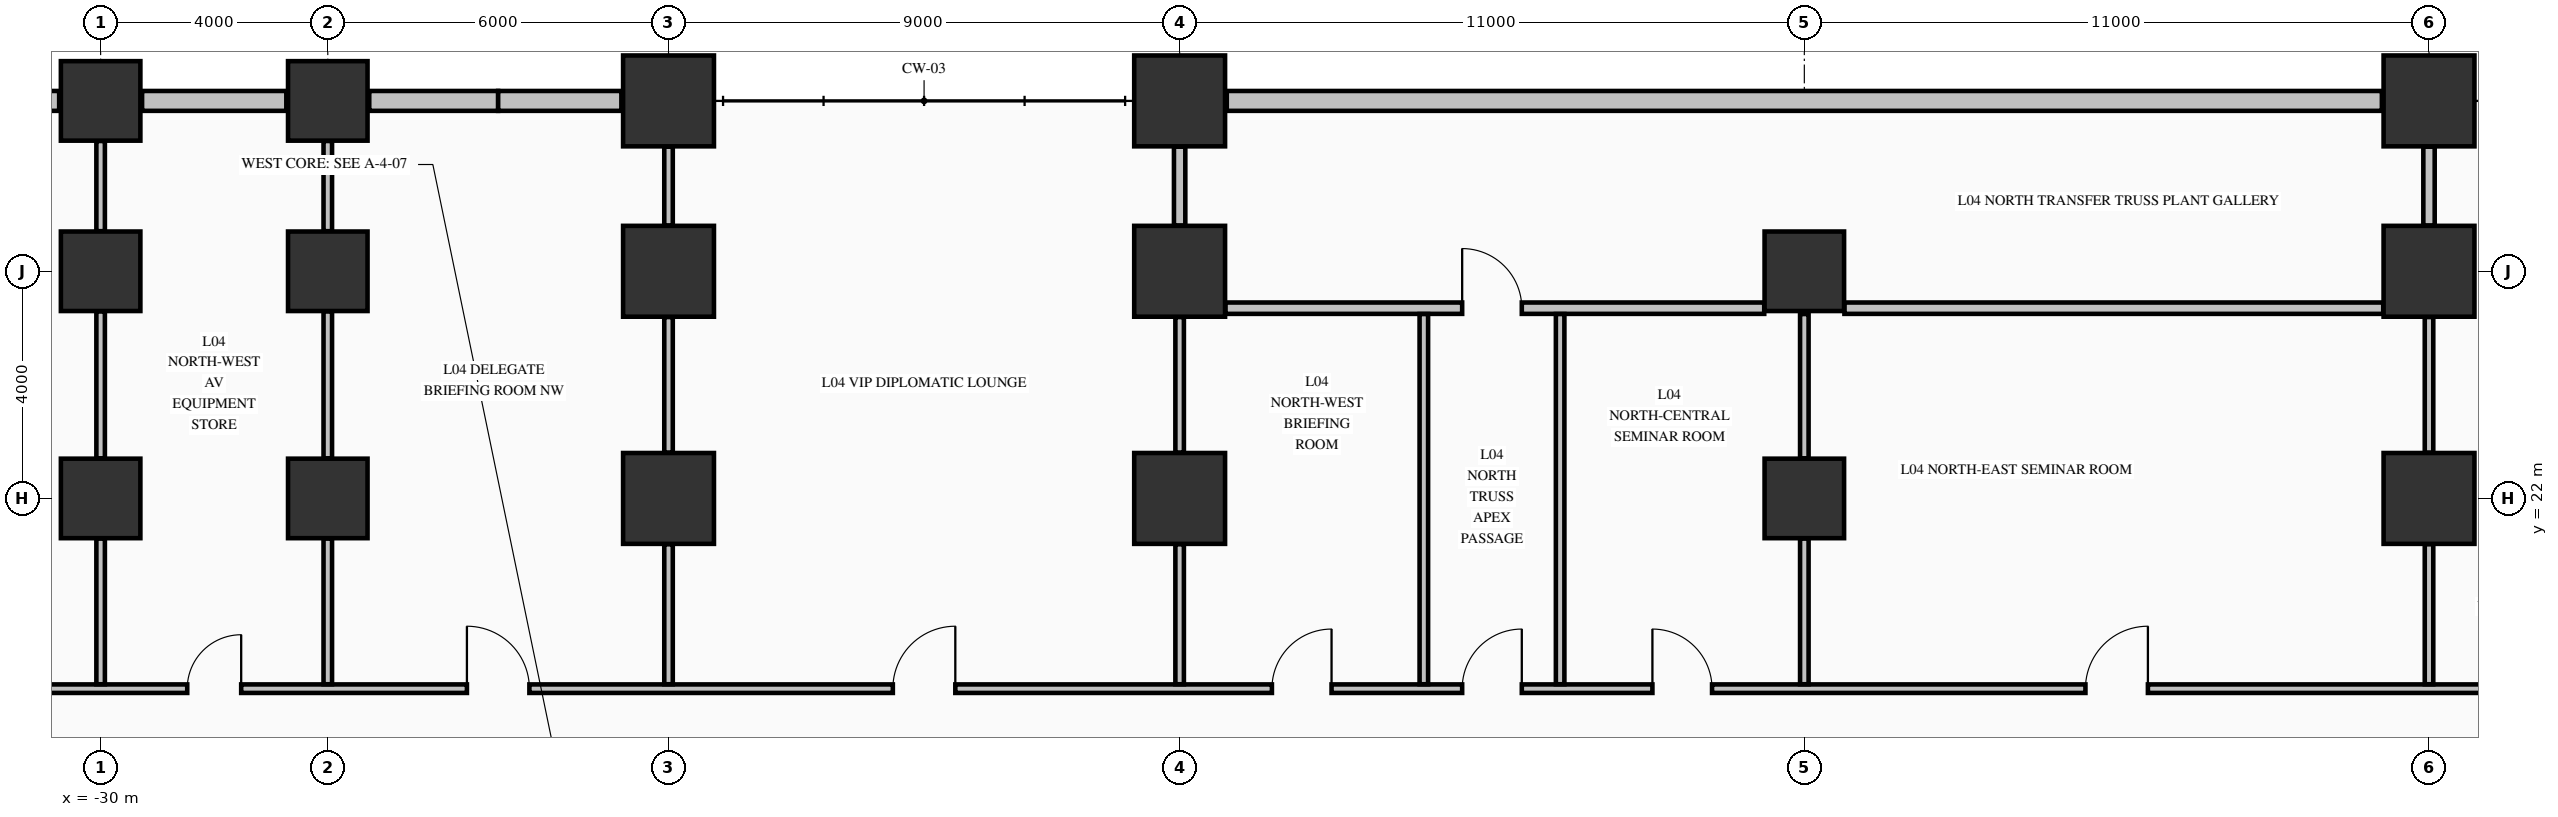
"""IFC4 building model, lengths in metres.
Left out: names, types, materials, properties, quantities, classifications, styles, units other than length and angle.
Written with IfcOpenShell. Run it as: python <this file> out.ifc"""

import sys

from ifc_helpers import new_model, si_unit, direction, frame, frame_2d, origin, origin_2d, place, context, subcontext, project, spatial, rectangle, extrude, element, fill, save


model = new_model("IFC4")
c1 = context("Model", 3, precision=1e-05, world=origin(), true_north=direction((0.0, 1.0)))
c2 = subcontext(c1, "Body", "Model", "MODEL_VIEW")
j1 = project(units=[si_unit("LENGTHUNIT", "METRE"), si_unit("PLANEANGLEUNIT", "RADIAN")], contexts=[c1])
p1 = place(None, origin())
s1 = spatial("IfcSite", under=j1, at=p1, CompositionType="ELEMENT")
p2 = place(p1, origin())
s2 = spatial("IfcBuilding", under=s1, at=p2, CompositionType="ELEMENT")
p3 = place(p2, frame((0.0, 0.0, 21.76)))
s3 = spatial("IfcBuildingStorey", under=s2, at=p3, CompositionType="ELEMENT", Elevation=21.76)
for number, where, z_axis, x_axis in (
    (1, (-30.0, 22.0, -0.45), (0.0, 0.0, 1.0), (1.0, 0.0, 0.0)),
    (2, (-30.0, 26.0, -0.45), (0.0, 0.0, 1.0), (1.0, 0.0, 0.0)),
    (3, (-30.0, 29.0, -0.45), (0.0, 0.0, 1.0), (1.0, 0.0, 0.0)),
    (4, (-26.0, 22.0, -0.45), (0.0, 0.0, 1.0), (1.0, 0.0, 0.0)),
    (5, (-26.0, 26.0, -0.45), (0.0, 0.0, 1.0), (1.0, 0.0, 0.0)),
    (6, (-26.0, 29.0, -0.45), (0.0, 0.0, 1.0), (1.0, 0.0, 0.0)),
):
    element("IfcColumn", number, at=place(p3, frame(where, z_axis=z_axis, x_axis=x_axis)), inside=s3, PredefinedType="COLUMN", context=c2, shape_type="SweptSolid", body=[
        extrude(rectangle(XDim=1.4, YDim=1.4, at=origin_2d()), origin(), (0.0, 0.0, 1.0), 5.44),
    ])
for number, where, z_axis, x_axis in (
    (7, (-20.0, 22.0, -0.45), (0.0, 0.0, 1.0), (1.0, 0.0, 0.0)),
    (8, (-20.0, 26.0, -0.45), (0.0, 0.0, 1.0), (1.0, 0.0, 0.0)),
    (9, (-20.0, 29.0, -0.45), (0.0, 0.0, 1.0), (1.0, 0.0, 0.0)),
    (10, (-11.0, 22.0, -0.45), (0.0, 0.0, 1.0), (1.0, 0.0, 0.0)),
    (11, (-11.0, 26.0, -0.45), (0.0, 0.0, 1.0), (1.0, 0.0, 0.0)),
    (12, (-11.0, 29.0, -0.45), (0.0, 0.0, 1.0), (1.0, 0.0, 0.0)),
):
    element("IfcColumn", number, at=place(p3, frame(where, z_axis=z_axis, x_axis=x_axis)), inside=s3, PredefinedType="COLUMN", context=c2, shape_type="SweptSolid", body=[
        extrude(rectangle(XDim=1.6, YDim=1.6, at=origin_2d()), origin(), (0.0, 0.0, 1.0), 5.44),
    ])
for number, where, z_axis, x_axis in (
    (13, (0.0, 22.0, -0.45), (0.0, 0.0, 1.0), (1.0, 0.0, 0.0)),
    (14, (0.0, 26.0, -0.45), (0.0, 0.0, 1.0), (1.0, 0.0, 0.0)),
):
    element("IfcColumn", number, at=place(p3, frame(where, z_axis=z_axis, x_axis=x_axis)), inside=s3, PredefinedType="COLUMN", context=c2, shape_type="SweptSolid", body=[
        extrude(rectangle(XDim=1.4, YDim=1.4, at=origin_2d()), origin(), (0.0, 0.0, 1.0), 5.44),
    ])
for number, where, z_axis, x_axis in (
    (15, (11.0, 22.0, -0.45), (0.0, 0.0, 1.0), (1.0, 0.0, 0.0)),
    (16, (11.0, 26.0, -0.45), (0.0, 0.0, 1.0), (1.0, 0.0, 0.0)),
    (17, (11.0, 29.0, -0.45), (0.0, 0.0, 1.0), (1.0, 0.0, 0.0)),
):
    element("IfcColumn", number, at=place(p3, frame(where, z_axis=z_axis, x_axis=x_axis)), inside=s3, PredefinedType="COLUMN", context=c2, shape_type="SweptSolid", body=[
        extrude(rectangle(XDim=1.6, YDim=1.6, at=origin_2d()), origin(), (0.0, 0.0, 1.0), 5.44),
    ])
for number, where, z_axis, x_axis in (
    (18, (-30.73, 29.0, 0.0), (0.0, 0.0, 1.0), (-1.0, 0.0, 0.0)),
    (19, (-26.73, 29.0, 0.0), (0.0, 0.0, 1.0), (-1.0, 0.0, 0.0)),
):
    element("IfcWall", number, at=place(p3, frame(where, z_axis=z_axis, x_axis=x_axis)), inside=s3, PredefinedType="STANDARD", context=c2, shape_type="SweptSolid", body=[
        extrude(rectangle(XDim=2.54, YDim=0.35, at=frame_2d((1.27, 0.0))), origin(), (0.0, 0.0, 1.0), 3.332),
    ])
p4 = place(p3, frame((-23.0, 29.0, 0.0), z_axis=(0.0, 0.0, 1.0), x_axis=(-1.0, 0.0, 0.0)))
e20 = element("IfcWall", 20, at=p4, inside=s3, PredefinedType="STANDARD", context=c2, shape_type="SweptSolid", body=[
    extrude(rectangle(XDim=2.27, YDim=0.35, at=frame_2d((1.135, 0.0))), origin(), (0.0, 0.0, 1.0), 3.332),
])
p5 = place(p3, frame((-20.83, 29.0, 0.0), z_axis=(0.0, 0.0, 1.0), x_axis=(-1.0, 0.0, 0.0)))
e21 = element("IfcWall", 21, at=p5, inside=s3, PredefinedType="STANDARD", context=c2, shape_type="SweptSolid", body=[
    extrude(rectangle(XDim=2.17, YDim=0.35, at=frame_2d((1.085, 0.0))), origin(), (0.0, 0.0, 1.0), 3.332),
])
p6 = place(p3, frame((10.17, 29.0, 0.0), z_axis=(0.0, 0.0, 1.0), x_axis=(-1.0, 0.0, 0.0)))
e22 = element("IfcWall", 22, at=p6, inside=s3, PredefinedType="STANDARD", context=c2, shape_type="SweptSolid", body=[
    extrude(rectangle(XDim=20.34, YDim=0.35, at=frame_2d((10.17, 0.0))), origin(), (0.0, 0.0, 1.0), 2.582),
])
p7 = place(p3, frame((-33.835, 18.65, 0.0), z_axis=(0.0, 0.0, 1.0), x_axis=(1.0, 0.0, 0.0)))
e23 = element("IfcWall", 23, at=p7, inside=s3, PredefinedType="PARTITIONING", context=c2, shape_type="SweptSolid", body=[
    extrude(rectangle(XDim=63.685, YDim=0.15, at=frame_2d((31.843, 0.0))), origin(), (0.0, 0.0, 1.0), 4.99),
])
p8 = place(p7, frame((27.81, 0.0, 0.0)))
e24 = element("IfcOpeningElement", 24, at=p8, cuts=e23, PredefinedType="OPENING", context=c2, shape_type="SweptSolid", body=[
    extrude(rectangle(XDim=1.05, YDim=2.15, at=frame_2d((0.525, 1.075))), frame((0.0, 0.085, 0.0), z_axis=(0.0, -1.0, 0.0), x_axis=(1.0, 0.0, 0.0)), (0.0, 0.0, 1.0), 0.17),
])
p9 = place(p7, frame((24.46, 0.0, 0.0)))
e25 = element("IfcOpeningElement", 25, at=p9, cuts=e23, PredefinedType="OPENING", context=c2, shape_type="SweptSolid", body=[
    extrude(rectangle(XDim=1.05, YDim=2.15, at=frame_2d((0.525, 1.075))), frame((0.0, 0.085, 0.0), z_axis=(0.0, -1.0, 0.0), x_axis=(1.0, 0.0, 0.0)), (0.0, 0.0, 1.0), 0.17),
])
p10 = place(p7, frame((31.16, 0.0, 0.0)))
e26 = element("IfcOpeningElement", 26, at=p10, cuts=e23, PredefinedType="OPENING", context=c2, shape_type="SweptSolid", body=[
    extrude(rectangle(XDim=1.05, YDim=2.15, at=frame_2d((0.525, 1.075))), frame((0.0, 0.085, 0.0), z_axis=(0.0, -1.0, 0.0), x_axis=(1.0, 0.0, 0.0)), (0.0, 0.0, 1.0), 0.17),
])
p11 = place(p7, frame((38.785, 0.0, 0.0)))
e27 = element("IfcOpeningElement", 27, at=p11, cuts=e23, PredefinedType="OPENING", context=c2, shape_type="SweptSolid", body=[
    extrude(rectangle(XDim=1.1, YDim=2.15, at=frame_2d((0.55, 1.075))), frame((0.0, 0.085, 0.0), z_axis=(0.0, -1.0, 0.0), x_axis=(1.0, 0.0, 0.0)), (0.0, 0.0, 1.0), 0.17),
])
p12 = place(p7, frame((1.285, 0.0, 0.0)))
e28 = element("IfcOpeningElement", 28, at=p12, cuts=e23, PredefinedType="OPENING", context=c2, shape_type="SweptSolid", body=[
    extrude(rectangle(XDim=1.1, YDim=2.15, at=frame_2d((0.55, 1.075))), frame((0.0, 0.085, 0.0), z_axis=(0.0, -1.0, 0.0), x_axis=(1.0, 0.0, 0.0)), (0.0, 0.0, 1.0), 0.17),
])
p13 = place(p7, frame((5.36, 0.0, 0.0)))
e29 = element("IfcOpeningElement", 29, at=p13, cuts=e23, PredefinedType="OPENING", context=c2, shape_type="SweptSolid", body=[
    extrude(rectangle(XDim=0.95, YDim=2.15, at=frame_2d((0.475, 1.075))), frame((0.0, 0.085, 0.0), z_axis=(0.0, -1.0, 0.0), x_axis=(1.0, 0.0, 0.0)), (0.0, 0.0, 1.0), 0.17),
])
p14 = place(p7, frame((10.285, 0.0, 0.0)))
e30 = element("IfcOpeningElement", 30, at=p14, cuts=e23, PredefinedType="OPENING", context=c2, shape_type="SweptSolid", body=[
    extrude(rectangle(XDim=1.1, YDim=2.15, at=frame_2d((0.55, 1.075))), frame((0.0, 0.085, 0.0), z_axis=(0.0, -1.0, 0.0), x_axis=(1.0, 0.0, 0.0)), (0.0, 0.0, 1.0), 0.17),
])
p15 = place(p7, frame((17.785, 0.0, 0.0)))
e31 = element("IfcOpeningElement", 31, at=p15, cuts=e23, PredefinedType="OPENING", context=c2, shape_type="SweptSolid", body=[
    extrude(rectangle(XDim=1.1, YDim=2.15, at=frame_2d((0.55, 1.075))), frame((0.0, 0.085, 0.0), z_axis=(0.0, -1.0, 0.0), x_axis=(1.0, 0.0, 0.0)), (0.0, 0.0, 1.0), 0.17),
])
p16 = place(p7, frame((61.215, 0.0, 0.0)))
e32 = element("IfcOpeningElement", 32, at=p16, cuts=e23, PredefinedType="OPENING", context=c2, shape_type="SweptSolid", body=[
    extrude(rectangle(XDim=1.1, YDim=2.15, at=frame_2d((0.55, 1.075))), frame((0.0, 0.085, 0.0), z_axis=(0.0, -1.0, 0.0), x_axis=(1.0, 0.0, 0.0)), (0.0, 0.0, 1.0), 0.17),
])
p17 = place(p7, frame((47.56, 0.0, 0.0)))
e33 = element("IfcOpeningElement", 33, at=p17, cuts=e23, PredefinedType="OPENING", context=c2, shape_type="SweptSolid", body=[
    extrude(rectangle(XDim=0.95, YDim=2.15, at=frame_2d((0.475, 1.075))), frame((0.0, 0.085, 0.0), z_axis=(0.0, -1.0, 0.0), x_axis=(1.0, 0.0, 0.0)), (0.0, 0.0, 1.0), 0.17),
])
p18 = place(p7, frame((51.31, 0.0, 0.0)))
e34 = element("IfcOpeningElement", 34, at=p18, cuts=e23, PredefinedType="OPENING", context=c2, shape_type="SweptSolid", body=[
    extrude(rectangle(XDim=1.05, YDim=2.15, at=frame_2d((0.525, 1.075))), frame((0.0, 0.085, 0.0), z_axis=(0.0, -1.0, 0.0), x_axis=(1.0, 0.0, 0.0)), (0.0, 0.0, 1.0), 0.17),
])
p19 = place(p7, frame((56.06, 0.0, 0.0)))
e35 = element("IfcOpeningElement", 35, at=p19, cuts=e23, PredefinedType="OPENING", context=c2, shape_type="SweptSolid", body=[
    extrude(rectangle(XDim=0.95, YDim=2.15, at=frame_2d((0.475, 1.075))), frame((0.0, 0.085, 0.0), z_axis=(0.0, -1.0, 0.0), x_axis=(1.0, 0.0, 0.0)), (0.0, 0.0, 1.0), 0.17),
])
p20 = place(p7, frame((58.535, 0.0, 0.0)))
e36 = element("IfcOpeningElement", 36, at=p20, cuts=e23, PredefinedType="OPENING", context=c2, shape_type="SweptSolid", body=[
    extrude(rectangle(XDim=0.9, YDim=2.15, at=frame_2d((0.45, 1.075))), frame((0.0, 0.085, 0.0), z_axis=(0.0, -1.0, 0.0), x_axis=(1.0, 0.0, 0.0)), (0.0, 0.0, 1.0), 0.17),
])
p21 = place(p3, frame((-10.194, 25.35, 0.0), z_axis=(0.0, 0.0, 1.0), x_axis=(1.0, 0.0, 0.0)))
e37 = element("IfcWall", 37, at=p21, inside=s3, PredefinedType="PARTITIONING", context=c2, shape_type="SweptSolid", body=[
    extrude(rectangle(XDim=9.488, YDim=0.2, at=frame_2d((4.744, 0.0))), origin(), (0.0, 0.0, 1.0), 3.332),
])
p22 = place(p21, frame((4.169, 0.0, 0.0)))
e38 = element("IfcOpeningElement", 38, at=p22, cuts=e37, PredefinedType="OPENING", context=c2, shape_type="SweptSolid", body=[
    extrude(rectangle(XDim=1.05, YDim=2.15, at=frame_2d((0.525, 1.075))), frame((0.0, 0.11, 0.0), z_axis=(0.0, -1.0, 0.0), x_axis=(1.0, 0.0, 0.0)), (0.0, 0.0, 1.0), 0.22),
])
p23 = place(p3, frame((0.706, 25.35, 0.0), z_axis=(0.0, 0.0, 1.0), x_axis=(1.0, 0.0, 0.0)))
e39 = element("IfcWall", 39, at=p23, inside=s3, PredefinedType="PARTITIONING", context=c2, shape_type="SweptSolid", body=[
    extrude(rectangle(XDim=9.488, YDim=0.2, at=frame_2d((4.744, 0.0))), origin(), (0.0, 0.0, 1.0), 3.332),
])
p24 = place(p3, frame((-30.0, 18.728, 0.0), z_axis=(0.0, 0.0, 1.0), x_axis=(0.0, 1.0, 0.0)))
e40 = element("IfcWall", 40, at=p24, inside=s3, PredefinedType="PARTITIONING", context=c2, shape_type="SweptSolid", body=[
    extrude(rectangle(XDim=2.566, YDim=0.15, at=frame_2d((1.283, 0.0))), origin(), (0.0, 0.0, 1.0), 3.332),
])
p25 = place(p3, frame((-30.0, 22.706, 0.0), z_axis=(0.0, 0.0, 1.0), x_axis=(0.0, 1.0, 0.0)))
e41 = element("IfcWall", 41, at=p25, inside=s3, PredefinedType="PARTITIONING", context=c2, shape_type="SweptSolid", body=[
    extrude(rectangle(XDim=2.588, YDim=0.15, at=frame_2d((1.294, 0.0))), origin(), (0.0, 0.0, 1.0), 3.332),
])
p26 = place(p3, frame((-30.0, 26.706, 0.0), z_axis=(0.0, 0.0, 1.0), x_axis=(0.0, 1.0, 0.0)))
e42 = element("IfcWall", 42, at=p26, inside=s3, PredefinedType="PARTITIONING", context=c2, shape_type="SweptSolid", body=[
    extrude(rectangle(XDim=1.588, YDim=0.15, at=frame_2d((0.794, 0.0))), origin(), (0.0, 0.0, 1.0), 3.332),
])
p27 = place(p3, frame((-26.0, 18.728, 0.0), z_axis=(0.0, 0.0, 1.0), x_axis=(0.0, 1.0, 0.0)))
e43 = element("IfcWall", 43, at=p27, inside=s3, PredefinedType="PARTITIONING", context=c2, shape_type="SweptSolid", body=[
    extrude(rectangle(XDim=2.566, YDim=0.15, at=frame_2d((1.283, 0.0))), origin(), (0.0, 0.0, 1.0), 3.332),
])
p28 = place(p3, frame((-26.0, 22.706, 0.0), z_axis=(0.0, 0.0, 1.0), x_axis=(0.0, 1.0, 0.0)))
e44 = element("IfcWall", 44, at=p28, inside=s3, PredefinedType="PARTITIONING", context=c2, shape_type="SweptSolid", body=[
    extrude(rectangle(XDim=2.588, YDim=0.15, at=frame_2d((1.294, 0.0))), origin(), (0.0, 0.0, 1.0), 3.332),
])
p29 = place(p3, frame((-26.0, 26.706, 0.0), z_axis=(0.0, 0.0, 1.0), x_axis=(0.0, 1.0, 0.0)))
e45 = element("IfcWall", 45, at=p29, inside=s3, PredefinedType="PARTITIONING", context=c2, shape_type="SweptSolid", body=[
    extrude(rectangle(XDim=1.588, YDim=0.15, at=frame_2d((0.794, 0.0))), origin(), (0.0, 0.0, 1.0), 3.332),
])
p30 = place(p3, frame((-20.0, 18.728, 0.0), z_axis=(0.0, 0.0, 1.0), x_axis=(0.0, 1.0, 0.0)))
e46 = element("IfcWall", 46, at=p30, inside=s3, PredefinedType="PARTITIONING", context=c2, shape_type="SweptSolid", body=[
    extrude(rectangle(XDim=2.466, YDim=0.15, at=frame_2d((1.233, 0.0))), origin(), (0.0, 0.0, 1.0), 3.332),
])
p31 = place(p3, frame((-20.0, 22.806, 0.0), z_axis=(0.0, 0.0, 1.0), x_axis=(0.0, 1.0, 0.0)))
e47 = element("IfcWall", 47, at=p31, inside=s3, PredefinedType="PARTITIONING", context=c2, shape_type="SweptSolid", body=[
    extrude(rectangle(XDim=2.388, YDim=0.15, at=frame_2d((1.194, 0.0))), origin(), (0.0, 0.0, 1.0), 3.332),
])
p32 = place(p3, frame((-20.0, 26.806, 0.0), z_axis=(0.0, 0.0, 1.0), x_axis=(0.0, 1.0, 0.0)))
e48 = element("IfcWall", 48, at=p32, inside=s3, PredefinedType="PARTITIONING", context=c2, shape_type="SweptSolid", body=[
    extrude(rectangle(XDim=1.388, YDim=0.15, at=frame_2d((0.694, 0.0))), origin(), (0.0, 0.0, 1.0), 3.332),
])
p33 = place(p3, frame((-11.0, 18.728, 0.0), z_axis=(0.0, 0.0, 1.0), x_axis=(0.0, 1.0, 0.0)))
e49 = element("IfcWall", 49, at=p33, inside=s3, PredefinedType="PARTITIONING", context=c2, shape_type="SweptSolid", body=[
    extrude(rectangle(XDim=2.466, YDim=0.15, at=frame_2d((1.233, 0.0))), origin(), (0.0, 0.0, 1.0), 3.332),
])
p34 = place(p3, frame((-11.0, 22.806, 0.0), z_axis=(0.0, 0.0, 1.0), x_axis=(0.0, 1.0, 0.0)))
e50 = element("IfcWall", 50, at=p34, inside=s3, PredefinedType="PARTITIONING", context=c2, shape_type="SweptSolid", body=[
    extrude(rectangle(XDim=2.388, YDim=0.15, at=frame_2d((1.194, 0.0))), origin(), (0.0, 0.0, 1.0), 3.332),
])
p35 = place(p3, frame((-11.0, 26.806, 0.0), z_axis=(0.0, 0.0, 1.0), x_axis=(0.0, 1.0, 0.0)))
e51 = element("IfcWall", 51, at=p35, inside=s3, PredefinedType="PARTITIONING", context=c2, shape_type="SweptSolid", body=[
    extrude(rectangle(XDim=1.388, YDim=0.2, at=frame_2d((0.694, 0.0))), origin(), (0.0, 0.0, 1.0), 3.332),
])
for number, where, z_axis, x_axis in (
    (52, (-6.7, 18.728, 0.0), (0.0, 0.0, 1.0), (0.0, 1.0, 0.0)),
    (53, (-4.3, 18.728, 0.0), (0.0, 0.0, 1.0), (0.0, 1.0, 0.0)),
):
    element("IfcWall", number, at=place(p3, frame(where, z_axis=z_axis, x_axis=x_axis)), inside=s3, PredefinedType="PARTITIONING", context=c2, shape_type="SweptSolid", body=[
        extrude(rectangle(XDim=6.519, YDim=0.15, at=frame_2d((3.26, 0.0))), origin(), (0.0, 0.0, 1.0), 4.99),
    ])
p36 = place(p3, frame((0.0, 18.728, 0.0), z_axis=(0.0, 0.0, 1.0), x_axis=(0.0, 1.0, 0.0)))
e54 = element("IfcWall", 54, at=p36, inside=s3, PredefinedType="PARTITIONING", context=c2, shape_type="SweptSolid", body=[
    extrude(rectangle(XDim=2.566, YDim=0.15, at=frame_2d((1.283, 0.0))), origin(), (0.0, 0.0, 1.0), 3.332),
])
p37 = place(p3, frame((0.0, 22.706, 0.0), z_axis=(0.0, 0.0, 1.0), x_axis=(0.0, 1.0, 0.0)))
e55 = element("IfcWall", 55, at=p37, inside=s3, PredefinedType="PARTITIONING", context=c2, shape_type="SweptSolid", body=[
    extrude(rectangle(XDim=2.541, YDim=0.15, at=frame_2d((1.271, 0.0))), origin(), (0.0, 0.0, 1.0), 3.332),
])
p38 = place(p3, frame((11.0, 18.728, 0.0), z_axis=(0.0, 0.0, 1.0), x_axis=(0.0, 1.0, 0.0)))
e56 = element("IfcWall", 56, at=p38, inside=s3, PredefinedType="PARTITIONING", context=c2, shape_type="SweptSolid", body=[
    extrude(rectangle(XDim=2.466, YDim=0.15, at=frame_2d((1.233, 0.0))), origin(), (0.0, 0.0, 1.0), 3.332),
])
p39 = place(p3, frame((11.0, 22.806, 0.0), z_axis=(0.0, 0.0, 1.0), x_axis=(0.0, 1.0, 0.0)))
e57 = element("IfcWall", 57, at=p39, inside=s3, PredefinedType="PARTITIONING", context=c2, shape_type="SweptSolid", body=[
    extrude(rectangle(XDim=2.388, YDim=0.15, at=frame_2d((1.194, 0.0))), origin(), (0.0, 0.0, 1.0), 3.332),
])
p40 = place(p3, frame((11.0, 26.806, 0.0), z_axis=(0.0, 0.0, 1.0), x_axis=(0.0, 1.0, 0.0)))
e58 = element("IfcWall", 58, at=p40, inside=s3, PredefinedType="PARTITIONING", context=c2, shape_type="SweptSolid", body=[
    extrude(rectangle(XDim=1.388, YDim=0.2, at=frame_2d((0.694, 0.0))), origin(), (0.0, 0.0, 1.0), 3.332),
])
p41 = place(p8, origin())
e59 = element("IfcDoor", 59, at=p41, inside=s3, OperationType="SINGLE_SWING_RIGHT", PredefinedType="DOOR", context=c2, shape_type="SweptSolid", body=[
    extrude(rectangle(XDim=1.05, YDim=2.15, at=frame_2d((0.525, 1.075))), frame((0.0, 0.025, 0.0), z_axis=(0.0, -1.0, 0.0), x_axis=(1.0, 0.0, 0.0)), (0.0, 0.0, 1.0), 0.05),
])
fill(e24, e59)
p42 = place(p22, origin())
e60 = element("IfcDoor", 60, at=p42, inside=s3, OperationType="SINGLE_SWING_LEFT", PredefinedType="DOOR", context=c2, shape_type="SweptSolid", body=[
    extrude(rectangle(XDim=1.05, YDim=2.15, at=frame_2d((0.525, 1.075))), frame((0.0, 0.025, 0.0), z_axis=(0.0, -1.0, 0.0), x_axis=(1.0, 0.0, 0.0)), (0.0, 0.0, 1.0), 0.05),
])
fill(e38, e60)
p43 = place(p9, origin())
e61 = element("IfcDoor", 61, at=p43, inside=s3, OperationType="SINGLE_SWING_RIGHT", PredefinedType="DOOR", context=c2, shape_type="SweptSolid", body=[
    extrude(rectangle(XDim=1.05, YDim=2.15, at=frame_2d((0.525, 1.075))), frame((0.0, 0.025, 0.0), z_axis=(0.0, -1.0, 0.0), x_axis=(1.0, 0.0, 0.0)), (0.0, 0.0, 1.0), 0.05),
])
fill(e25, e61)
p44 = place(p10, origin())
e62 = element("IfcDoor", 62, at=p44, inside=s3, OperationType="SINGLE_SWING_LEFT", PredefinedType="DOOR", context=c2, shape_type="SweptSolid", body=[
    extrude(rectangle(XDim=1.05, YDim=2.15, at=frame_2d((0.525, 1.075))), frame((0.0, 0.025, 0.0), z_axis=(0.0, -1.0, 0.0), x_axis=(1.0, 0.0, 0.0)), (0.0, 0.0, 1.0), 0.05),
])
fill(e26, e62)
p45 = place(p11, origin())
e63 = element("IfcDoor", 63, at=p45, inside=s3, OperationType="SINGLE_SWING_RIGHT", PredefinedType="DOOR", context=c2, shape_type="SweptSolid", body=[
    extrude(rectangle(XDim=1.1, YDim=2.15, at=frame_2d((0.55, 1.075))), frame((0.0, 0.025, 0.0), z_axis=(0.0, -1.0, 0.0), x_axis=(1.0, 0.0, 0.0)), (0.0, 0.0, 1.0), 0.05),
])
fill(e27, e63)
p46 = place(p13, origin())
e64 = element("IfcDoor", 64, at=p46, inside=s3, OperationType="SINGLE_SWING_RIGHT", PredefinedType="DOOR", context=c2, shape_type="SweptSolid", body=[
    extrude(rectangle(XDim=0.95, YDim=2.15, at=frame_2d((0.475, 1.075))), frame((0.0, 0.025, 0.0), z_axis=(0.0, -1.0, 0.0), x_axis=(1.0, 0.0, 0.0)), (0.0, 0.0, 1.0), 0.05),
])
fill(e29, e64)
p47 = place(p14, origin())
e65 = element("IfcDoor", 65, at=p47, inside=s3, OperationType="SINGLE_SWING_LEFT", PredefinedType="DOOR", context=c2, shape_type="SweptSolid", body=[
    extrude(rectangle(XDim=1.1, YDim=2.15, at=frame_2d((0.55, 1.075))), frame((0.0, 0.025, 0.0), z_axis=(0.0, -1.0, 0.0), x_axis=(1.0, 0.0, 0.0)), (0.0, 0.0, 1.0), 0.05),
])
fill(e30, e65)
p48 = place(p15, origin())
e66 = element("IfcDoor", 66, at=p48, inside=s3, OperationType="SINGLE_SWING_RIGHT", PredefinedType="DOOR", context=c2, shape_type="SweptSolid", body=[
    extrude(rectangle(XDim=1.1, YDim=2.15, at=frame_2d((0.55, 1.075))), frame((0.0, 0.025, 0.0), z_axis=(0.0, -1.0, 0.0), x_axis=(1.0, 0.0, 0.0)), (0.0, 0.0, 1.0), 0.05),
])
fill(e31, e66)
save(model, sys.argv[1])
